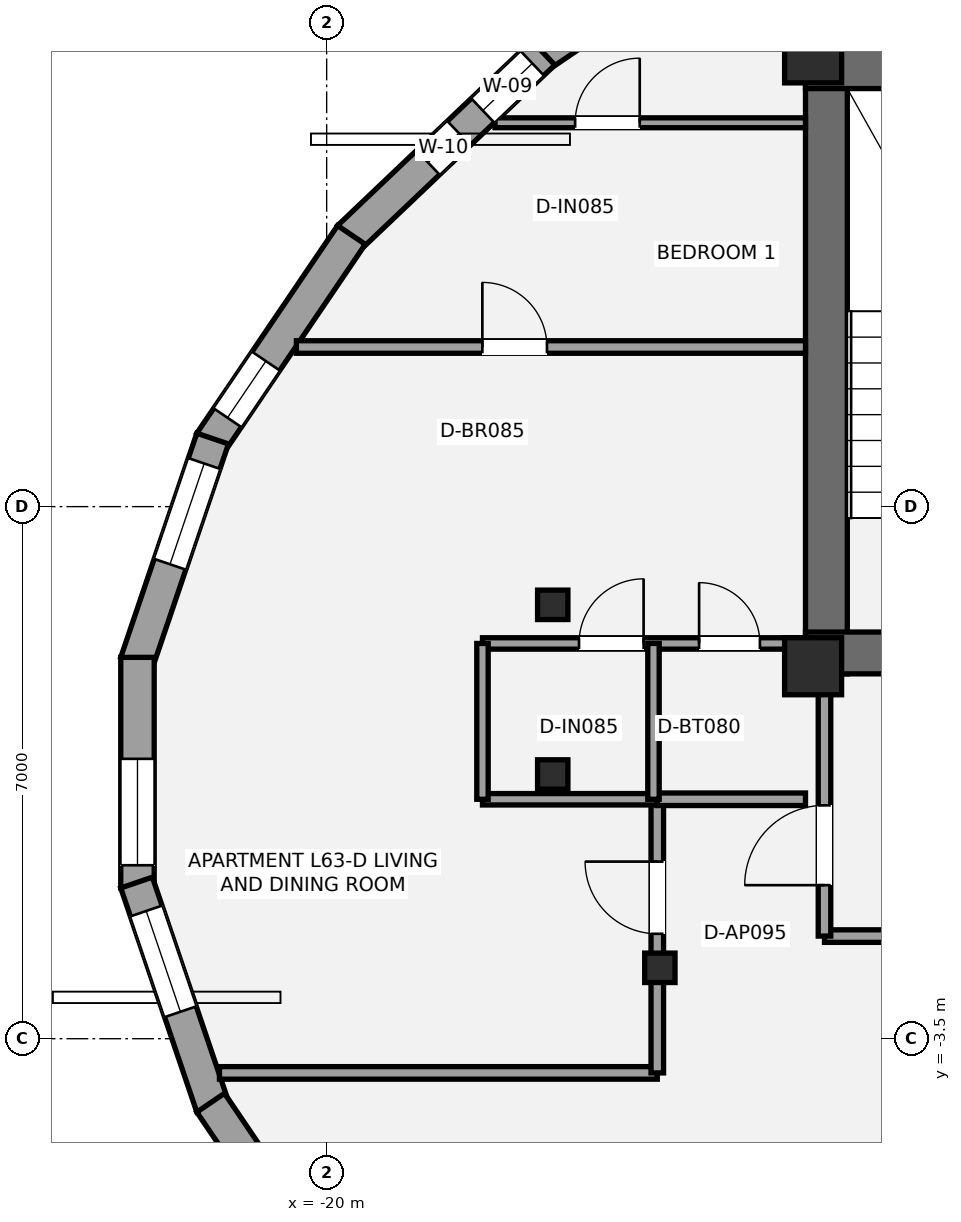
"""IFC4 building model, lengths in metres.
Left out: names, types, materials, properties, quantities, classifications, styles, units other than length and angle.
Written with IfcOpenShell. Run it as: python <this file> out.ifc"""

import sys

from ifc_helpers import new_model, si_unit, direction, frame, frame_2d, origin, origin_2d, place, context, subcontext, project, spatial, rectangle, i_section, extrude, element, fill, save


model = new_model("IFC4")
c1 = context("Model", 3, precision=1e-05, world=origin(), true_north=direction((0.0, 1.0)))
c2 = subcontext(c1, "Body", "Model", "MODEL_VIEW")
j1 = project(units=[si_unit("LENGTHUNIT", "METRE"), si_unit("PLANEANGLEUNIT", "RADIAN")], contexts=[c1])
p1 = place(None, origin())
s1 = spatial("IfcSite", under=j1, at=p1, CompositionType="ELEMENT")
p2 = place(p1, origin())
s2 = spatial("IfcBuilding", under=s1, at=p2, CompositionType="ELEMENT")
p3 = place(p2, frame((0.0, 0.0, 225.75)))
s3 = spatial("IfcBuildingStorey", under=s2, at=p3, CompositionType="ELEMENT", Elevation=225.75)
p4 = place(p3, frame((-13.425, 1.3, 0.0), z_axis=(0.0, 0.0, 1.0), x_axis=(0.0, 1.0, 0.0)))
e1 = element("IfcWall", 1, at=p4, inside=s3, PredefinedType="SHEAR", context=c2, shape_type="SweptSolid", body=[
    extrude(rectangle(XDim=8.25, YDim=0.55, at=frame_2d((4.125, 0.0))), origin(), (0.0, 0.0, 1.0), 3.15),
])
p5 = place(p3, frame((-13.7, 9.275, 0.0), z_axis=(0.0, 0.0, 1.0), x_axis=(1.0, 0.0, 0.0)))
e2 = element("IfcWall", 2, at=p5, inside=s3, PredefinedType="SHEAR", context=c2, shape_type="SweptSolid", body=[
    extrude(rectangle(XDim=9.175, YDim=0.55, at=frame_2d((4.587, 0.0))), origin(), (0.0, 0.0, 1.0), 3.15),
])
p6 = place(p3, frame((-4.925, 1.575, 0.0), z_axis=(0.0, 0.0, 1.0), x_axis=(-1.0, 0.0, 0.0)))
e3 = element("IfcWall", 3, at=p6, inside=s3, PredefinedType="SHEAR", context=c2, shape_type="SweptSolid", body=[
    extrude(rectangle(XDim=8.775, YDim=0.55, at=frame_2d((4.387, 0.0))), origin(), (0.0, 0.0, 1.0), 3.15),
])
p7 = place(p6, frame((5.375, 0.0, 0.0)))
e4 = element("IfcOpeningElement", 4, at=p7, cuts=e3, PredefinedType="OPENING", context=c2, shape_type="SweptSolid", body=[
    extrude(rectangle(XDim=1.05, YDim=2.15, at=frame_2d((0.525, 1.075))), frame((0.0, 0.285, 0.0), z_axis=(0.0, -1.0, 0.0), x_axis=(1.0, 0.0, 0.0)), (0.0, 0.0, 1.0), 0.57),
])
p8 = place(p6, frame((3.705, 0.0, 0.0)))
e5 = element("IfcOpeningElement", 5, at=p8, cuts=e3, PredefinedType="OPENING", context=c2, shape_type="SweptSolid", body=[
    extrude(rectangle(XDim=1.1, YDim=2.2, at=frame_2d((0.55, 1.1))), frame((0.0, 0.285, 0.0), z_axis=(0.0, -1.0, 0.0), x_axis=(1.0, 0.0, 0.0)), (0.0, 0.0, 1.0), 0.57),
])
for number, where, z_axis, x_axis in (
    (6, (-13.6, 1.4, 0.0), (0.0, 0.0, 1.0), (1.0, 0.0, 0.0)),
    (7, (-13.6, 9.45, 0.0), (0.0, 0.0, 1.0), (1.0, 0.0, 0.0)),
):
    element("IfcColumn", number, at=place(p3, frame(where, z_axis=z_axis, x_axis=x_axis)), inside=s3, PredefinedType="PILASTER", context=c2, shape_type="SweptSolid", body=[
        extrude(rectangle(XDim=0.75, YDim=0.75, at=origin_2d()), origin(), (0.0, 0.0, 1.0), 3.15),
    ])
for number, where, z_axis, x_axis in (
    (8, (-17.026, 2.208, 0.0), (0.0, 0.0, 1.0), (1.0, 0.0, 0.0)),
    (9, (-17.026, -0.024, 0.0), (0.0, 0.0, 1.0), (1.0, 0.0, 0.0)),
    (10, (-15.616, -2.567, 0.0), (0.0, 0.0, 1.0), (1.0, 0.0, 0.0)),
):
    element("IfcColumn", number, at=place(p3, frame(where, z_axis=z_axis, x_axis=x_axis)), inside=s3, PredefinedType="COLUMN", context=c2, shape_type="SweptSolid", body=[
        extrude(i_section(OverallWidth=0.399, OverallDepth=0.387, WebThickness=0.021, FlangeThickness=0.033, at=origin_2d()), origin(), (0.0, 0.0, 1.0), 3.15),
    ])
p9 = place(p3, frame((-17.177, 9.447, 0.0), z_axis=(0.0, 0.0, 1.0), x_axis=(0.827635686249, 0.561265686504, 0.0)))
e11 = element("IfcWall", 11, at=p9, inside=s3, PredefinedType="STANDARD", context=c2, shape_type="SweptSolid", body=[
    extrude(rectangle(XDim=3.749, YDim=0.44, at=frame_2d((1.875, 0.0))), origin(), (0.0, 0.0, 1.0), 2.336),
])
p10 = place(p9, frame((0.5, 0.0, 0.55)))
e12 = element("IfcOpeningElement", 12, at=p10, cuts=e11, PredefinedType="OPENING", context=c2, shape_type="SweptSolid", body=[
    extrude(rectangle(XDim=1.75, YDim=1.55, at=frame_2d((0.875, 0.775))), frame((0.0, 0.23, 0.0), z_axis=(0.0, -1.0, 0.0), x_axis=(1.0, 0.0, 0.0)), (0.0, 0.0, 1.0), 0.46),
])
p11 = place(p3, frame((-19.705, 7.038, 0.0), z_axis=(0.0, 0.0, 1.0), x_axis=(0.724503260132, 0.689271373306, 0.0)))
e13 = element("IfcWall", 13, at=p11, inside=s3, PredefinedType="STANDARD", context=c2, shape_type="SweptSolid", body=[
    extrude(rectangle(XDim=3.527, YDim=0.44, at=frame_2d((1.764, 0.0))), origin(), (0.0, 0.0, 1.0), 2.336),
])
p12 = place(p11, frame((2.427, 0.0, 0.58)))
e14 = element("IfcOpeningElement", 14, at=p12, cuts=e13, PredefinedType="OPENING", context=c2, shape_type="SweptSolid", body=[
    extrude(rectangle(XDim=0.9, YDim=1.35, at=frame_2d((0.45, 0.675))), frame((0.0, 0.23, 0.0), z_axis=(0.0, -1.0, 0.0), x_axis=(1.0, 0.0, 0.0)), (0.0, 0.0, 1.0), 0.46),
])
p13 = place(p11, frame((1.434, 0.0, 0.58)))
e15 = element("IfcOpeningElement", 15, at=p13, cuts=e13, PredefinedType="OPENING", context=c2, shape_type="SweptSolid", body=[
    extrude(rectangle(XDim=0.56, YDim=1.15, at=frame_2d((0.28, 0.575))), frame((0.0, 0.23, 0.0), z_axis=(0.0, -1.0, 0.0), x_axis=(1.0, 0.0, 0.0)), (0.0, 0.0, 1.0), 0.46),
])
p14 = place(p3, frame((-21.526, 4.342, 0.0), z_axis=(0.0, 0.0, 1.0), x_axis=(0.561186647073, 0.827689281764, 0.0)))
e16 = element("IfcWall", 16, at=p14, inside=s3, PredefinedType="STANDARD", context=c2, shape_type="SweptSolid", body=[
    extrude(rectangle(XDim=3.301, YDim=0.44, at=frame_2d((1.65, 0.0))), origin(), (0.0, 0.0, 1.0), 2.336),
])
p15 = place(p14, frame((0.395, 0.0, 0.58)))
e17 = element("IfcOpeningElement", 17, at=p15, cuts=e16, PredefinedType="OPENING", context=c2, shape_type="SweptSolid", body=[
    extrude(rectangle(XDim=0.9, YDim=1.35, at=frame_2d((0.45, 0.675))), frame((0.0, 0.23, 0.0), z_axis=(0.0, -1.0, 0.0), x_axis=(1.0, 0.0, 0.0)), (0.0, 0.0, 1.0), 0.46),
])
p16 = place(p3, frame((-22.501, 1.446, 0.0), z_axis=(0.0, 0.0, 1.0), x_axis=(0.32132647272, 0.946968477791, 0.0)))
e18 = element("IfcWall", 18, at=p16, inside=s3, PredefinedType="STANDARD", context=c2, shape_type="SweptSolid", body=[
    extrude(rectangle(XDim=3.114, YDim=0.44, at=frame_2d((1.557, 0.0))), origin(), (0.0, 0.0, 1.0), 2.336),
])
p17 = place(p16, frame((1.368, 0.0, 0.58)))
e19 = element("IfcOpeningElement", 19, at=p17, cuts=e18, PredefinedType="OPENING", context=c2, shape_type="SweptSolid", body=[
    extrude(rectangle(XDim=1.4, YDim=1.55, at=frame_2d((0.7, 0.775))), frame((0.0, 0.23, 0.0), z_axis=(0.0, -1.0, 0.0), x_axis=(1.0, 0.0, 0.0)), (0.0, 0.0, 1.0), 0.46),
])
p18 = place(p3, frame((-22.489, -1.517, 0.0), z_axis=(0.0, 0.0, 1.0), x_axis=(0.0, 1.0, 0.0)))
e20 = element("IfcWall", 20, at=p18, inside=s3, PredefinedType="STANDARD", context=c2, shape_type="SweptSolid", body=[
    extrude(rectangle(XDim=3.034, YDim=0.44, at=frame_2d((1.517, 0.0))), origin(), (0.0, 0.0, 1.0), 2.336),
])
p19 = place(p18, frame((0.299, 0.0, 0.55)))
e21 = element("IfcOpeningElement", 21, at=p19, cuts=e20, PredefinedType="OPENING", context=c2, shape_type="SweptSolid", body=[
    extrude(rectangle(XDim=1.4, YDim=1.55, at=frame_2d((0.7, 0.775))), frame((0.0, 0.23, 0.0), z_axis=(0.0, -1.0, 0.0), x_axis=(1.0, 0.0, 0.0)), (0.0, 0.0, 1.0), 0.46),
])
p20 = place(p3, frame((-21.5, -4.395, 0.0), z_axis=(0.0, 0.0, 1.0), x_axis=(-0.32132647272, 0.946968477791, 0.0)))
e22 = element("IfcWall", 22, at=p20, inside=s3, PredefinedType="STANDARD", context=c2, shape_type="SweptSolid", body=[
    extrude(rectangle(XDim=3.114, YDim=0.44, at=frame_2d((1.557, 0.0))), origin(), (0.0, 0.0, 1.0), 2.336),
])
p21 = place(p20, frame((1.32, 0.0, 0.58)))
e23 = element("IfcOpeningElement", 23, at=p21, cuts=e22, PredefinedType="OPENING", context=c2, shape_type="SweptSolid", body=[
    extrude(rectangle(XDim=1.4, YDim=1.55, at=frame_2d((0.7, 0.775))), frame((0.0, 0.23, 0.0), z_axis=(0.0, -1.0, 0.0), x_axis=(1.0, 0.0, 0.0)), (0.0, 0.0, 1.0), 0.46),
])
p22 = place(p3, frame((-19.674, -7.074, 0.0), z_axis=(0.0, 0.0, 1.0), x_axis=(-0.561186647073, 0.827689281764, 0.0)))
e24 = element("IfcWall", 24, at=p22, inside=s3, PredefinedType="STANDARD", context=c2, shape_type="SweptSolid", body=[
    extrude(rectangle(XDim=3.301, YDim=0.44, at=frame_2d((1.65, 0.0))), origin(), (0.0, 0.0, 1.0), 2.336),
])
p23 = place(p3, frame((-13.45, -2.15, 0.0), z_axis=(0.0, 0.0, 1.0), x_axis=(1.0, 0.0, 0.0)))
e25 = element("IfcWall", 25, at=p23, inside=s3, PredefinedType="PARTITIONING", context=c2, shape_type="SweptSolid", body=[
    extrude(rectangle(XDim=6.25, YDim=0.165, at=frame_2d((3.125, 0.0))), origin(), (0.0, 0.0, 1.0), 2.423),
])
p24 = place(p3, frame((-13.45, -2.15, 0.0), z_axis=(0.0, 0.0, 1.0), x_axis=(0.0, 1.0, 0.0)))
e26 = element("IfcWall", 26, at=p24, inside=s3, PredefinedType="PARTITIONING", context=c2, shape_type="SweptSolid", body=[
    extrude(rectangle(XDim=3.5, YDim=0.165, at=frame_2d((1.75, 0.0))), origin(), (0.0, 0.0, 1.0), 2.423),
])
p25 = place(p24, frame((0.67, 0.0, 0.0)))
e27 = element("IfcOpeningElement", 27, at=p25, cuts=e26, PredefinedType="OPENING", context=c2, shape_type="SweptSolid", body=[
    extrude(rectangle(XDim=1.05, YDim=2.15, at=frame_2d((0.525, 1.075))), frame((0.0, 0.093, 0.0), z_axis=(0.0, -1.0, 0.0), x_axis=(1.0, 0.0, 0.0)), (0.0, 0.0, 1.0), 0.185),
])
p26 = place(p3, frame((-21.41, -3.95, 0.0), z_axis=(0.0, 0.0, 1.0), x_axis=(1.0, 0.0, 0.0)))
e28 = element("IfcWall", 28, at=p26, inside=s3, PredefinedType="PARTITIONING", context=c2, shape_type="SweptSolid", body=[
    extrude(rectangle(XDim=5.76, YDim=0.165, at=frame_2d((2.88, 0.0))), origin(), (0.0, 0.0, 1.0), 2.423),
])
p27 = place(p3, frame((-15.65, -3.95, 0.0), z_axis=(0.0, 0.0, 1.0), x_axis=(0.0, 1.0, 0.0)))
e29 = element("IfcWall", 29, at=p27, inside=s3, PredefinedType="PARTITIONING", context=c2, shape_type="SweptSolid", body=[
    extrude(rectangle(XDim=3.6, YDim=0.165, at=frame_2d((1.8, 0.0))), origin(), (0.0, 0.0, 1.0), 2.357),
])
p28 = place(p27, frame((1.83, 0.0, 0.0)))
e30 = element("IfcOpeningElement", 30, at=p28, cuts=e29, PredefinedType="OPENING", context=c2, shape_type="SweptSolid", body=[
    extrude(rectangle(XDim=0.95, YDim=2.15, at=frame_2d((0.475, 1.075))), frame((0.0, 0.093, 0.0), z_axis=(0.0, -1.0, 0.0), x_axis=(1.0, 0.0, 0.0)), (0.0, 0.0, 1.0), 0.185),
])
p29 = place(p3, frame((-15.65, -0.35, 0.0), z_axis=(0.0, 0.0, 1.0), x_axis=(1.0, 0.0, 0.0)))
e31 = element("IfcWall", 31, at=p29, inside=s3, PredefinedType="PARTITIONING", context=c2, shape_type="SweptSolid", body=[
    extrude(rectangle(XDim=1.95, YDim=0.165, at=frame_2d((0.975, 0.0))), origin(), (0.0, 0.0, 1.0), 2.97),
])
p30 = place(p3, frame((-20.398, 5.6, 0.0), z_axis=(0.0, 0.0, 1.0), x_axis=(1.0, 0.0, 0.0)))
e32 = element("IfcWall", 32, at=p30, inside=s3, PredefinedType="PARTITIONING", context=c2, shape_type="SweptSolid", body=[
    extrude(rectangle(XDim=6.698, YDim=0.165, at=frame_2d((3.349, 0.0))), origin(), (0.0, 0.0, 1.0), 2.423),
])
p31 = place(p30, frame((2.447, 0.0, 0.0)))
e33 = element("IfcOpeningElement", 33, at=p31, cuts=e32, PredefinedType="OPENING", context=c2, shape_type="SweptSolid", body=[
    extrude(rectangle(XDim=0.85, YDim=2.1, at=frame_2d((0.425, 1.05))), frame((0.0, 0.093, 0.0), z_axis=(0.0, -1.0, 0.0), x_axis=(1.0, 0.0, 0.0)), (0.0, 0.0, 1.0), 0.185),
])
p32 = place(p3, frame((-17.95, 1.7, 0.0), z_axis=(0.0, 0.0, 1.0), x_axis=(1.0, 0.0, 0.0)))
e34 = element("IfcWall", 34, at=p32, inside=s3, PredefinedType="PLUMBINGWALL", context=c2, shape_type="SweptSolid", body=[
    extrude(rectangle(XDim=4.25, YDim=0.15, at=frame_2d((2.125, 0.0))), origin(), (0.0, 0.0, 1.0), 2.423),
])
p33 = place(p32, frame((2.85, 0.0, 0.0)))
e35 = element("IfcOpeningElement", 35, at=p33, cuts=e34, PredefinedType="OPENING", context=c2, shape_type="SweptSolid", body=[
    extrude(rectangle(XDim=0.8, YDim=2.1, at=frame_2d((0.4, 1.05))), frame((0.0, 0.085, 0.0), z_axis=(0.0, -1.0, 0.0), x_axis=(1.0, 0.0, 0.0)), (0.0, 0.0, 1.0), 0.17),
])
p34 = place(p32, frame((1.27, 0.0, 0.0)))
e36 = element("IfcOpeningElement", 36, at=p34, cuts=e34, PredefinedType="OPENING", context=c2, shape_type="SweptSolid", body=[
    extrude(rectangle(XDim=0.85, YDim=2.1, at=frame_2d((0.425, 1.05))), frame((0.0, 0.085, 0.0), z_axis=(0.0, -1.0, 0.0), x_axis=(1.0, 0.0, 0.0)), (0.0, 0.0, 1.0), 0.17),
])
p35 = place(p3, frame((-17.95, -0.35, 0.0), z_axis=(0.0, 0.0, 1.0), x_axis=(1.0, 0.0, 0.0)))
e37 = element("IfcWall", 37, at=p35, inside=s3, PredefinedType="PLUMBINGWALL", context=c2, shape_type="SweptSolid", body=[
    extrude(rectangle(XDim=2.3, YDim=0.15, at=frame_2d((1.15, 0.0))), origin(), (0.0, 0.0, 1.0), 2.423),
])
p36 = place(p3, frame((-15.7, -0.35, 0.0), z_axis=(0.0, 0.0, 1.0), x_axis=(0.0, 1.0, 0.0)))
e38 = element("IfcWall", 38, at=p36, inside=s3, PredefinedType="PLUMBINGWALL", context=c2, shape_type="SweptSolid", body=[
    extrude(rectangle(XDim=2.05, YDim=0.15, at=frame_2d((1.025, 0.0))), origin(), (0.0, 0.0, 1.0), 2.97),
])
p37 = place(p3, frame((-17.95, -0.35, 0.0), z_axis=(0.0, 0.0, 1.0), x_axis=(0.0, 1.0, 0.0)))
e39 = element("IfcWall", 39, at=p37, inside=s3, PredefinedType="PLUMBINGWALL", context=c2, shape_type="SweptSolid", body=[
    extrude(rectangle(XDim=2.05, YDim=0.15, at=frame_2d((1.025, 0.0))), origin(), (0.0, 0.0, 1.0), 2.423),
])
p38 = place(p3, frame((-17.785, 8.55, 0.0), z_axis=(0.0, 0.0, 1.0), x_axis=(1.0, 0.0, 0.0)))
e40 = element("IfcWall", 40, at=p38, inside=s3, PredefinedType="PARTITIONING", context=c2, shape_type="SweptSolid", body=[
    extrude(rectangle(XDim=4.085, YDim=0.13, at=frame_2d((2.042, 0.0))), origin(), (0.0, 0.0, 1.0), 2.423),
])
p39 = place(p38, frame((1.054, 0.0, 0.0)))
e41 = element("IfcOpeningElement", 41, at=p39, cuts=e40, PredefinedType="OPENING", context=c2, shape_type="SweptSolid", body=[
    extrude(rectangle(XDim=0.85, YDim=2.1, at=frame_2d((0.425, 1.05))), frame((0.0, 0.075, 0.0), z_axis=(0.0, -1.0, 0.0), x_axis=(1.0, 0.0, 0.0)), (0.0, 0.0, 1.0), 0.15),
])
p40 = place(p12, origin())
e42 = element("IfcWindow", 42, at=p40, inside=s3, PartitioningType="SINGLE_PANEL", PredefinedType="WINDOW", context=c2, shape_type="SweptSolid", body=[
    extrude(rectangle(XDim=0.9, YDim=1.35, at=frame_2d((0.45, 0.675))), frame((0.0, -0.01, 0.0), z_axis=(0.0, -1.0, 0.0), x_axis=(1.0, 0.0, 0.0)), (0.0, 0.0, 1.0), 0.06),
])
fill(e14, e42)
p41 = place(p15, origin())
e43 = element("IfcWindow", 43, at=p41, inside=s3, PartitioningType="SINGLE_PANEL", PredefinedType="WINDOW", context=c2, shape_type="SweptSolid", body=[
    extrude(rectangle(XDim=0.9, YDim=1.35, at=frame_2d((0.45, 0.675))), frame((0.0, -0.01, 0.0), z_axis=(0.0, -1.0, 0.0), x_axis=(1.0, 0.0, 0.0)), (0.0, 0.0, 1.0), 0.06),
])
fill(e17, e43)
p42 = place(p17, origin())
e44 = element("IfcWindow", 44, at=p42, inside=s3, PartitioningType="SINGLE_PANEL", PredefinedType="WINDOW", context=c2, shape_type="SweptSolid", body=[
    extrude(rectangle(XDim=1.4, YDim=1.55, at=frame_2d((0.7, 0.775))), frame((0.0, -0.01, 0.0), z_axis=(0.0, -1.0, 0.0), x_axis=(1.0, 0.0, 0.0)), (0.0, 0.0, 1.0), 0.06),
])
fill(e19, e44)
p43 = place(p19, origin())
e45 = element("IfcWindow", 45, at=p43, inside=s3, PartitioningType="SINGLE_PANEL", PredefinedType="WINDOW", context=c2, shape_type="SweptSolid", body=[
    extrude(rectangle(XDim=1.4, YDim=1.55, at=frame_2d((0.7, 0.775))), frame((0.0, -0.01, 0.0), z_axis=(0.0, -1.0, 0.0), x_axis=(1.0, 0.0, 0.0)), (0.0, 0.0, 1.0), 0.06),
])
fill(e21, e45)
p44 = place(p21, origin())
e46 = element("IfcWindow", 46, at=p44, inside=s3, PartitioningType="SINGLE_PANEL", PredefinedType="WINDOW", context=c2, shape_type="SweptSolid", body=[
    extrude(rectangle(XDim=1.4, YDim=1.55, at=frame_2d((0.7, 0.775))), frame((0.0, -0.01, 0.0), z_axis=(0.0, -1.0, 0.0), x_axis=(1.0, 0.0, 0.0)), (0.0, 0.0, 1.0), 0.06),
])
fill(e23, e46)
p45 = place(p13, origin())
e47 = element("IfcWindow", 47, at=p45, inside=s3, PartitioningType="SINGLE_PANEL", PredefinedType="WINDOW", context=c2, shape_type="SweptSolid", body=[
    extrude(rectangle(XDim=0.56, YDim=1.15, at=frame_2d((0.28, 0.575))), frame((0.0, -0.01, 0.0), z_axis=(0.0, -1.0, 0.0), x_axis=(1.0, 0.0, 0.0)), (0.0, 0.0, 1.0), 0.06),
])
fill(e15, e47)
p46 = place(p25, origin())
e48 = element("IfcDoor", 48, at=p46, inside=s3, OperationType="SINGLE_SWING_LEFT", PredefinedType="DOOR", context=c2, shape_type="SweptSolid", body=[
    extrude(rectangle(XDim=1.05, YDim=2.15, at=frame_2d((0.525, 1.075))), frame((0.0, 0.025, 0.0), z_axis=(0.0, -1.0, 0.0), x_axis=(1.0, 0.0, 0.0)), (0.0, 0.0, 1.0), 0.05),
])
fill(e27, e48)
p47 = place(p28, origin())
e49 = element("IfcDoor", 49, at=p47, inside=s3, OperationType="SINGLE_SWING_RIGHT", PredefinedType="DOOR", context=c2, shape_type="SweptSolid", body=[
    extrude(rectangle(XDim=0.95, YDim=2.15, at=frame_2d((0.475, 1.075))), frame((0.0, 0.025, 0.0), z_axis=(0.0, -1.0, 0.0), x_axis=(1.0, 0.0, 0.0)), (0.0, 0.0, 1.0), 0.05),
])
fill(e30, e49)
p48 = place(p33, origin())
e50 = element("IfcDoor", 50, at=p48, inside=s3, OperationType="SINGLE_SWING_LEFT", PredefinedType="DOOR", context=c2, shape_type="SweptSolid", body=[
    extrude(rectangle(XDim=0.8, YDim=2.1, at=frame_2d((0.4, 1.05))), frame((0.0, 0.025, 0.0), z_axis=(0.0, -1.0, 0.0), x_axis=(1.0, 0.0, 0.0)), (0.0, 0.0, 1.0), 0.05),
])
fill(e35, e50)
p49 = place(p34, origin())
e51 = element("IfcDoor", 51, at=p49, inside=s3, OperationType="SINGLE_SWING_RIGHT", PredefinedType="DOOR", context=c2, shape_type="SweptSolid", body=[
    extrude(rectangle(XDim=0.85, YDim=2.1, at=frame_2d((0.425, 1.05))), frame((0.0, 0.025, 0.0), z_axis=(0.0, -1.0, 0.0), x_axis=(1.0, 0.0, 0.0)), (0.0, 0.0, 1.0), 0.05),
])
fill(e36, e51)
p50 = place(p31, origin())
e52 = element("IfcDoor", 52, at=p50, inside=s3, OperationType="SINGLE_SWING_LEFT", PredefinedType="DOOR", context=c2, shape_type="SweptSolid", body=[
    extrude(rectangle(XDim=0.85, YDim=2.1, at=frame_2d((0.425, 1.05))), frame((0.0, 0.025, 0.0), z_axis=(0.0, -1.0, 0.0), x_axis=(1.0, 0.0, 0.0)), (0.0, 0.0, 1.0), 0.05),
])
fill(e33, e52)
p51 = place(p39, origin())
e53 = element("IfcDoor", 53, at=p51, inside=s3, OperationType="SINGLE_SWING_RIGHT", PredefinedType="DOOR", context=c2, shape_type="SweptSolid", body=[
    extrude(rectangle(XDim=0.85, YDim=2.1, at=frame_2d((0.425, 1.05))), frame((0.0, 0.025, 0.0), z_axis=(0.0, -1.0, 0.0), x_axis=(1.0, 0.0, 0.0)), (0.0, 0.0, 1.0), 0.05),
])
fill(e41, e53)
save(model, sys.argv[1])
